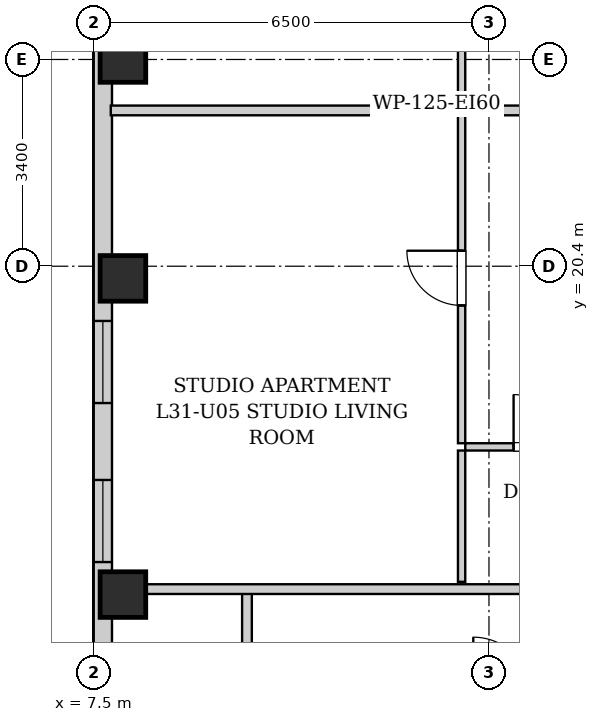
"""IFC4 building model, lengths in metres.
Left out: names, types, materials, properties, quantities, classifications, styles, units other than length and angle.
Written with IfcOpenShell. Run it as: python <this file> out.ifc"""

import sys

from ifc_helpers import new_model, si_unit, direction, frame, frame_2d, origin, origin_2d, place, context, subcontext, project, spatial, rectangle, extrude, element, fill, save


model = new_model("IFC4")
c1 = context("Model", 3, precision=1e-05, world=origin(), true_north=direction((0.0, 1.0)))
c2 = subcontext(c1, "Body", "Model", "MODEL_VIEW")
j1 = project(units=[si_unit("LENGTHUNIT", "METRE"), si_unit("PLANEANGLEUNIT", "RADIAN")], contexts=[c1])
p1 = place(None, origin())
s1 = spatial("IfcSite", under=j1, at=p1, CompositionType="ELEMENT")
p2 = place(p1, origin())
s2 = spatial("IfcBuilding", under=s1, at=p2, CompositionType="ELEMENT")
p3 = place(p2, frame((0.0, 0.0, 110.3)))
s3 = spatial("IfcBuildingStorey", under=s2, at=p3, CompositionType="ELEMENT", Elevation=110.3)
for number, where, z_axis, x_axis in (
    (1, (7.98, 15.0, 0.0), (0.0, 0.0, 1.0), (1.0, 0.0, 0.0)),
    (2, (7.98, 20.2, 0.0), (0.0, 0.0, 1.0), (1.0, 0.0, 0.0)),
    (3, (7.98, 23.8, 0.0), (0.0, 0.0, 1.0), (1.0, 0.0, 0.0)),
):
    element("IfcColumn", number, at=place(p3, frame(where, z_axis=z_axis, x_axis=x_axis)), inside=s3, PredefinedType="COLUMN", context=c2, shape_type="SweptSolid", body=[
        extrude(rectangle(XDim=0.75, YDim=0.75, at=origin_2d()), origin(), (0.0, 0.0, 1.0), 3.2),
    ])
p4 = place(p3, frame((7.65, 2.5, 0.0), z_axis=(0.0, 0.0, 1.0), x_axis=(0.0, 1.0, 0.0)))
e4 = element("IfcWall", 4, at=p4, inside=s3, PredefinedType="SOLIDWALL", context=c2, shape_type="SweptSolid", body=[
    extrude(rectangle(XDim=38.3, YDim=0.3, at=frame_2d((19.15, 0.0))), origin(), (0.0, 0.0, 1.0), 2.94),
])
p5 = place(p4, frame((3.38, 0.0, 0.55)))
e5 = element("IfcOpeningElement", 5, at=p5, cuts=e4, PredefinedType="OPENING", context=c2, shape_type="SweptSolid", body=[
    extrude(rectangle(XDim=1.35, YDim=1.2, at=frame_2d((0.675, 0.6))), frame((0.0, 0.16, 0.0), z_axis=(0.0, -1.0, 0.0), x_axis=(1.0, 0.0, 0.0)), (0.0, 0.0, 1.0), 0.32),
])
p6 = place(p4, frame((1.135, 0.0, 0.55)))
e6 = element("IfcOpeningElement", 6, at=p6, cuts=e4, PredefinedType="OPENING", context=c2, shape_type="SweptSolid", body=[
    extrude(rectangle(XDim=1.35, YDim=1.2, at=frame_2d((0.675, 0.6))), frame((0.0, 0.16, 0.0), z_axis=(0.0, -1.0, 0.0), x_axis=(1.0, 0.0, 0.0)), (0.0, 0.0, 1.0), 0.32),
])
p7 = place(p4, frame((33.946, 0.0, 0.55)))
e7 = element("IfcOpeningElement", 7, at=p7, cuts=e4, PredefinedType="OPENING", context=c2, shape_type="SweptSolid", body=[
    extrude(rectangle(XDim=1.35, YDim=1.2, at=frame_2d((0.675, 0.6))), frame((0.0, 0.16, 0.0), z_axis=(0.0, -1.0, 0.0), x_axis=(1.0, 0.0, 0.0)), (0.0, 0.0, 1.0), 0.32),
])
p8 = place(p4, frame((32.035, 0.0, 0.55)))
e8 = element("IfcOpeningElement", 8, at=p8, cuts=e4, PredefinedType="OPENING", context=c2, shape_type="SweptSolid", body=[
    extrude(rectangle(XDim=1.35, YDim=1.2, at=frame_2d((0.675, 0.6))), frame((0.0, 0.16, 0.0), z_axis=(0.0, -1.0, 0.0), x_axis=(1.0, 0.0, 0.0)), (0.0, 0.0, 1.0), 0.32),
])
p9 = place(p4, frame((15.65, 0.0, 0.55)))
e9 = element("IfcOpeningElement", 9, at=p9, cuts=e4, PredefinedType="OPENING", context=c2, shape_type="SweptSolid", body=[
    extrude(rectangle(XDim=1.35, YDim=1.2, at=frame_2d((0.675, 0.6))), frame((0.0, 0.16, 0.0), z_axis=(0.0, -1.0, 0.0), x_axis=(1.0, 0.0, 0.0)), (0.0, 0.0, 1.0), 0.32),
])
p10 = place(p4, frame((13.035, 0.0, 0.55)))
e10 = element("IfcOpeningElement", 10, at=p10, cuts=e4, PredefinedType="OPENING", context=c2, shape_type="SweptSolid", body=[
    extrude(rectangle(XDim=1.35, YDim=1.2, at=frame_2d((0.675, 0.6))), frame((0.0, 0.16, 0.0), z_axis=(0.0, -1.0, 0.0), x_axis=(1.0, 0.0, 0.0)), (0.0, 0.0, 1.0), 0.32),
])
p11 = place(p4, frame((22.831, 0.0, 0.55)))
e11 = element("IfcOpeningElement", 11, at=p11, cuts=e4, PredefinedType="OPENING", context=c2, shape_type="SweptSolid", body=[
    extrude(rectangle(XDim=1.35, YDim=1.2, at=frame_2d((0.675, 0.6))), frame((0.0, 0.16, 0.0), z_axis=(0.0, -1.0, 0.0), x_axis=(1.0, 0.0, 0.0)), (0.0, 0.0, 1.0), 0.32),
])
p12 = place(p4, frame((24.441, 0.0, 0.55)))
e12 = element("IfcOpeningElement", 12, at=p12, cuts=e4, PredefinedType="OPENING", context=c2, shape_type="SweptSolid", body=[
    extrude(rectangle(XDim=1.35, YDim=1.2, at=frame_2d((0.675, 0.6))), frame((0.0, 0.16, 0.0), z_axis=(0.0, -1.0, 0.0), x_axis=(1.0, 0.0, 0.0)), (0.0, 0.0, 1.0), 0.32),
])
p13 = place(p3, frame((10.02, 13.35, 0.0), z_axis=(0.0, 0.0, 1.0), x_axis=(0.0, 1.0, 0.0)))
e13 = element("IfcWall", 13, at=p13, inside=s3, PredefinedType="PARTITIONING", context=c2, shape_type="SweptSolid", body=[
    extrude(rectangle(XDim=1.74, YDim=0.16, at=frame_2d((0.87, 0.0))), origin(), (0.0, 0.0, 1.0), 2.94),
])
p14 = place(p3, frame((7.78, 15.09, 0.0), z_axis=(0.0, 0.0, 1.0), x_axis=(1.0, 0.0, 0.0)))
e14 = element("IfcWall", 14, at=p14, inside=s3, PredefinedType="PARTITIONING", context=c2, shape_type="SweptSolid", body=[
    extrude(rectangle(XDim=8.36, YDim=0.16, at=frame_2d((4.18, 0.0))), origin(), (0.0, 0.0, 1.0), 2.313),
])
p15 = place(p3, frame((7.78, 22.962, 0.0), z_axis=(0.0, 0.0, 1.0), x_axis=(1.0, 0.0, 0.0)))
e15 = element("IfcWall", 15, at=p15, inside=s3, PredefinedType="PARTITIONING", context=c2, shape_type="SweptSolid", body=[
    extrude(rectangle(XDim=8.28, YDim=0.16, at=frame_2d((4.14, 0.0))), origin(), (0.0, 0.0, 1.0), 2.94),
])
p16 = place(p3, frame((13.61, 17.429, 0.0), z_axis=(0.0, 0.0, 1.0), x_axis=(1.0, 0.0, 0.0)))
e16 = element("IfcWall", 16, at=p16, inside=s3, PredefinedType="PARTITIONING", context=c2, shape_type="SweptSolid", body=[
    extrude(rectangle(XDim=2.45, YDim=0.12, at=frame_2d((1.225, 0.0))), origin(), (0.0, 0.0, 1.0), 2.94),
])
p17 = place(p16, frame((0.795, 0.0, 0.0)))
e17 = element("IfcOpeningElement", 17, at=p17, cuts=e16, PredefinedType="OPENING", context=c2, shape_type="SweptSolid", body=[
    extrude(rectangle(XDim=0.86, YDim=2.05, at=frame_2d((0.43, 1.025))), frame((0.0, 0.07, 0.0), z_axis=(0.0, -1.0, 0.0), x_axis=(1.0, 0.0, 0.0)), (0.0, 0.0, 1.0), 0.14),
])
p18 = place(p3, frame((13.55, 15.21, 0.0), z_axis=(0.0, 0.0, 1.0), x_axis=(0.0, 1.0, 0.0)))
e18 = element("IfcWall", 18, at=p18, inside=s3, PredefinedType="PARTITIONING", context=c2, shape_type="SweptSolid", body=[
    extrude(rectangle(XDim=2.159, YDim=0.12, at=frame_2d((1.08, 0.0))), origin(), (0.0, 0.0, 1.0), 2.94),
])
p19 = place(p3, frame((13.55, 17.489, 0.0), z_axis=(0.0, 0.0, 1.0), x_axis=(0.0, 1.0, 0.0)))
e19 = element("IfcWall", 19, at=p19, inside=s3, PredefinedType="PARTITIONING", context=c2, shape_type="SweptSolid", body=[
    extrude(rectangle(XDim=5.433, YDim=0.12, at=frame_2d((2.717, 0.0))), origin(), (0.0, 0.0, 1.0), 2.94),
])
p20 = place(p19, frame((2.266, 0.0, 0.0)))
e20 = element("IfcOpeningElement", 20, at=p20, cuts=e19, PredefinedType="OPENING", context=c2, shape_type="SweptSolid", body=[
    extrude(rectangle(XDim=0.9, YDim=2.05, at=frame_2d((0.45, 1.025))), frame((0.0, 0.07, 0.0), z_axis=(0.0, -1.0, 0.0), x_axis=(1.0, 0.0, 0.0)), (0.0, 0.0, 1.0), 0.14),
])
p21 = place(p3, frame((13.55, 23.082, 0.0), z_axis=(0.0, 0.0, 1.0), x_axis=(0.0, 1.0, 0.0)))
e21 = element("IfcWall", 21, at=p21, inside=s3, PredefinedType="PARTITIONING", context=c2, shape_type="SweptSolid", body=[
    extrude(rectangle(XDim=1.85, YDim=0.12, at=frame_2d((0.925, 0.0))), origin(), (0.0, 0.0, 1.0), 2.94),
])
p22 = place(p17, origin())
e22 = element("IfcDoor", 22, at=p22, inside=s3, OperationType="SINGLE_SWING_LEFT", PredefinedType="DOOR", context=c2, shape_type="SweptSolid", body=[
    extrude(rectangle(XDim=0.86, YDim=2.05, at=frame_2d((0.43, 1.025))), frame((0.0, 0.025, 0.0), z_axis=(0.0, -1.0, 0.0), x_axis=(1.0, 0.0, 0.0)), (0.0, 0.0, 1.0), 0.05),
])
fill(e17, e22)
p23 = place(p20, origin())
e23 = element("IfcDoor", 23, at=p23, inside=s3, OperationType="SINGLE_SWING_RIGHT", PredefinedType="DOOR", context=c2, shape_type="SweptSolid", body=[
    extrude(rectangle(XDim=0.9, YDim=2.05, at=frame_2d((0.45, 1.025))), frame((0.0, 0.025, 0.0), z_axis=(0.0, -1.0, 0.0), x_axis=(1.0, 0.0, 0.0)), (0.0, 0.0, 1.0), 0.05),
])
fill(e20, e23)
p24 = place(p9, origin())
e24 = element("IfcWindow", 24, at=p24, inside=s3, PartitioningType="SINGLE_PANEL", PredefinedType="WINDOW", context=c2, shape_type="SweptSolid", body=[
    extrude(rectangle(XDim=1.35, YDim=1.2, at=frame_2d((0.675, 0.6))), frame((0.0, 0.03, 0.0), z_axis=(0.0, -1.0, 0.0), x_axis=(1.0, 0.0, 0.0)), (0.0, 0.0, 1.0), 0.06),
])
fill(e9, e24)
p25 = place(p10, origin())
e25 = element("IfcWindow", 25, at=p25, inside=s3, PartitioningType="SINGLE_PANEL", PredefinedType="WINDOW", context=c2, shape_type="SweptSolid", body=[
    extrude(rectangle(XDim=1.35, YDim=1.2, at=frame_2d((0.675, 0.6))), frame((0.0, 0.03, 0.0), z_axis=(0.0, -1.0, 0.0), x_axis=(1.0, 0.0, 0.0)), (0.0, 0.0, 1.0), 0.06),
])
fill(e10, e25)
save(model, sys.argv[1])
